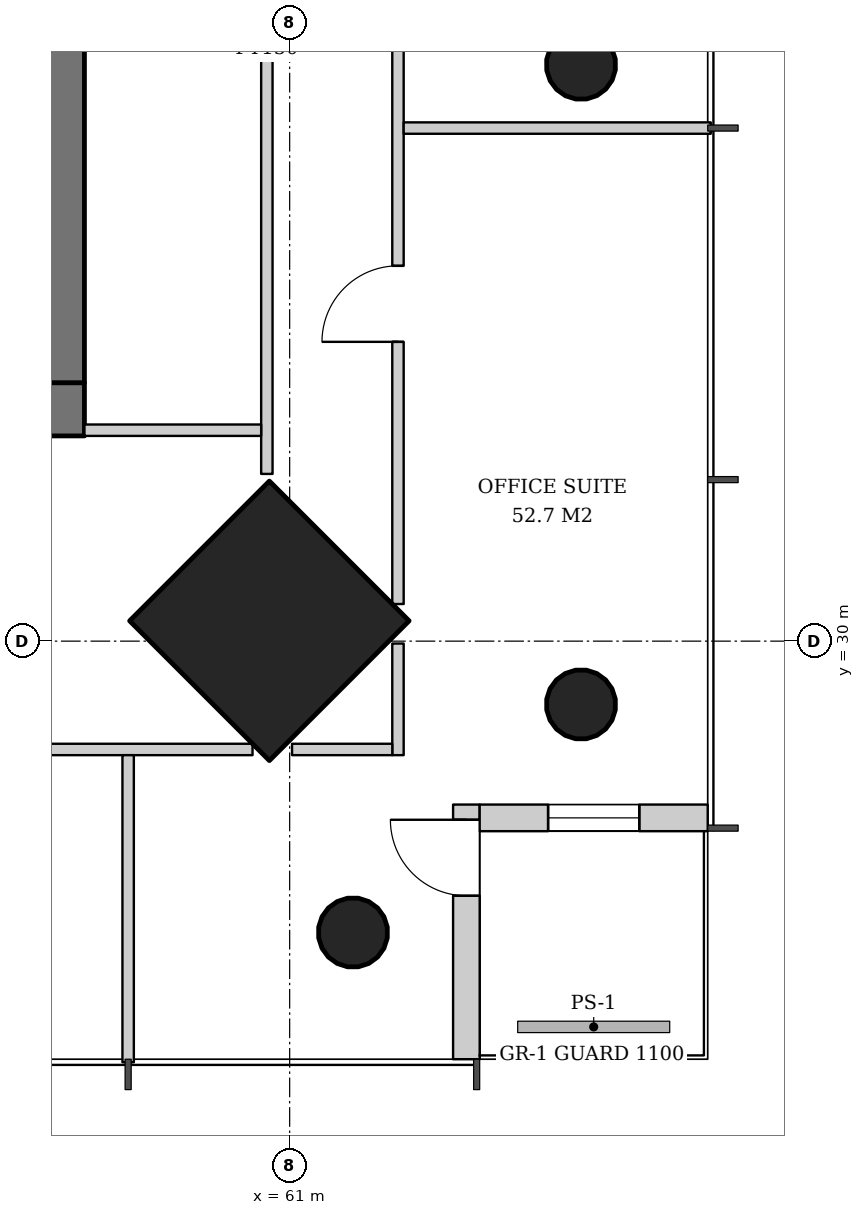
"""IFC4 building model, lengths in metres.
Left out: names, types, materials, properties, quantities, classifications, styles, units other than length and angle.
Written with IfcOpenShell. Run it as: python <this file> out.ifc"""

import sys

from ifc_helpers import new_model, si_unit, direction, frame, frame_2d, origin, origin_2d, place, context, subcontext, project, spatial, rectangle, hollow_circle, extrude, element, fill, save


model = new_model("IFC4")
c1 = context("Model", 3, precision=1e-05, world=origin(), true_north=direction((0.0, 1.0)))
c2 = subcontext(c1, "Body", "Model", "MODEL_VIEW")
j1 = project(units=[si_unit("LENGTHUNIT", "METRE"), si_unit("PLANEANGLEUNIT", "RADIAN")], contexts=[c1])
p1 = place(None, origin())
s1 = spatial("IfcSite", under=j1, at=p1, CompositionType="ELEMENT")
p2 = place(p1, origin())
s2 = spatial("IfcBuilding", under=s1, at=p2, CompositionType="ELEMENT")
p3 = place(p2, frame((0.0, 0.0, 150.2)))
s3 = spatial("IfcBuildingStorey", under=s2, at=p3, CompositionType="ELEMENT", Elevation=150.2)
p4 = place(p3, frame((64.871, 29.129, 0.0), z_axis=(-0.031898107953, 0.031898107953, 0.998981992539), x_axis=(-0.707106781187, -0.707106781187, 0.0)))
e1 = element("IfcColumn", 1, at=p4, inside=s3, PredefinedType="COLUMN", context=c2, shape_type="SweptSolid", body=[
    extrude(hollow_circle(Radius=0.457, WallThickness=0.03, at=origin_2d()), origin(), (0.0, 0.0, 1.0), 3.804),
])
p5 = place(p3, frame((64.871, 37.564, 0.0), z_axis=(-0.031910269556, 0.015987237665, 0.999362868496), x_axis=(-0.447933021895, -0.894067115991, 0.0)))
e2 = element("IfcColumn", 2, at=p5, inside=s3, PredefinedType="COLUMN", context=c2, shape_type="SweptSolid", body=[
    extrude(hollow_circle(Radius=0.457, WallThickness=0.03, at=origin_2d()), origin(), (0.0, 0.0, 1.0), 3.802),
])
p6 = place(p3, frame((60.771, 30.229, 0.0), z_axis=(-0.031962158256, 0.031962158256, 0.998977898093), x_axis=(-0.707106781187, -0.707106781187, 0.0)))
e3 = element("IfcColumn", 3, at=p6, inside=s3, PredefinedType="COLUMN", context=c2, shape_type="SweptSolid", body=[
    extrude(rectangle(XDim=2.6, YDim=2.6, at=origin_2d()), origin(), (0.0, 0.0, 1.0), 3.804),
])
p7 = place(p3, frame((61.871, 26.129, 0.0), z_axis=(-0.031898107953, 0.031898107953, 0.998981992539), x_axis=(-0.707106781187, -0.707106781187, 0.0)))
e4 = element("IfcColumn", 4, at=p7, inside=s3, PredefinedType="COLUMN", context=c2, shape_type="SweptSolid", body=[
    extrude(hollow_circle(Radius=0.457, WallThickness=0.03, at=origin_2d()), origin(), (0.0, 0.0, 1.0), 3.804),
])
p8 = place(p3, frame((31.7, 33.05, 0.0), z_axis=(0.0, 0.0, 1.0), x_axis=(1.0, 0.0, 0.0)))
e5 = element("IfcWall", 5, at=p8, inside=s3, PredefinedType="SHEAR", context=c2, shape_type="SweptSolid", body=[
    extrude(rectangle(XDim=26.6, YDim=0.7, at=frame_2d((13.3, 0.0))), origin(), (0.0, 0.0, 1.0), 3.8),
])
p9 = place(p8, frame((7.3, 0.0, 0.0)))
e6 = element("IfcOpeningElement", 6, at=p9, cuts=e5, PredefinedType="OPENING", context=c2, shape_type="SweptSolid", body=[
    extrude(rectangle(XDim=1.0, YDim=2.1, at=frame_2d((0.5, 1.05))), frame((0.0, 0.36, 0.0), z_axis=(0.0, -1.0, 0.0), x_axis=(1.0, 0.0, 0.0)), (0.0, 0.0, 1.0), 0.72),
])
p10 = place(p8, frame((18.75, 0.0, 0.0)))
e7 = element("IfcOpeningElement", 7, at=p10, cuts=e5, PredefinedType="OPENING", context=c2, shape_type="SweptSolid", body=[
    extrude(rectangle(XDim=1.0, YDim=2.1, at=frame_2d((0.5, 1.05))), frame((0.0, 0.36, 0.0), z_axis=(0.0, -1.0, 0.0), x_axis=(1.0, 0.0, 0.0)), (0.0, 0.0, 1.0), 0.72),
])
p11 = place(p8, frame((1.85, 0.0, 0.0)))
e8 = element("IfcOpeningElement", 8, at=p11, cuts=e5, PredefinedType="OPENING", context=c2, shape_type="SweptSolid", body=[
    extrude(rectangle(XDim=1.0, YDim=2.1, at=frame_2d((0.5, 1.05))), frame((0.0, 0.36, 0.0), z_axis=(0.0, -1.0, 0.0), x_axis=(1.0, 0.0, 0.0)), (0.0, 0.0, 1.0), 0.72),
])
p12 = place(p8, frame((4.7, 0.0, 0.0)))
e9 = element("IfcOpeningElement", 9, at=p12, cuts=e5, PredefinedType="OPENING", context=c2, shape_type="SweptSolid", body=[
    extrude(rectangle(XDim=1.0, YDim=2.1, at=frame_2d((0.5, 1.05))), frame((0.0, 0.36, 0.0), z_axis=(0.0, -1.0, 0.0), x_axis=(1.0, 0.0, 0.0)), (0.0, 0.0, 1.0), 0.72),
])
p13 = place(p8, frame((12.44, 0.0, 0.0)))
e10 = element("IfcOpeningElement", 10, at=p13, cuts=e5, PredefinedType="OPENING", context=c2, shape_type="SweptSolid", body=[
    extrude(rectangle(XDim=1.0, YDim=2.1, at=frame_2d((0.5, 1.05))), frame((0.0, 0.36, 0.0), z_axis=(0.0, -1.0, 0.0), x_axis=(1.0, 0.0, 0.0)), (0.0, 0.0, 1.0), 0.72),
])
p14 = place(p8, frame((20.644, 0.0, 0.0)))
e11 = element("IfcOpeningElement", 11, at=p14, cuts=e5, PredefinedType="OPENING", context=c2, shape_type="SweptSolid", body=[
    extrude(rectangle(XDim=1.0, YDim=2.1, at=frame_2d((0.5, 1.05))), frame((0.0, 0.36, 0.0), z_axis=(0.0, -1.0, 0.0), x_axis=(1.0, 0.0, 0.0)), (0.0, 0.0, 1.0), 0.72),
])
p15 = place(p8, frame((23.544, 0.0, 0.0)))
e12 = element("IfcOpeningElement", 12, at=p15, cuts=e5, PredefinedType="OPENING", context=c2, shape_type="SweptSolid", body=[
    extrude(rectangle(XDim=1.0, YDim=2.1, at=frame_2d((0.5, 1.05))), frame((0.0, 0.36, 0.0), z_axis=(0.0, -1.0, 0.0), x_axis=(1.0, 0.0, 0.0)), (0.0, 0.0, 1.0), 0.72),
])
p16 = place(p3, frame((57.95, 33.4, 0.0), z_axis=(0.0, 0.0, 1.0), x_axis=(0.0, 1.0, 0.0)))
e13 = element("IfcWall", 13, at=p16, inside=s3, PredefinedType="SHEAR", context=c2, shape_type="SweptSolid", body=[
    extrude(rectangle(XDim=25.2, YDim=0.7, at=frame_2d((12.6, 0.0))), origin(), (0.0, 0.0, 1.0), 3.8),
])
p17 = place(p16, frame((11.7, 0.0, 0.0)))
e14 = element("IfcOpeningElement", 14, at=p17, cuts=e13, PredefinedType="OPENING", context=c2, shape_type="SweptSolid", body=[
    extrude(rectangle(XDim=1.8, YDim=2.4, at=frame_2d((0.9, 1.2))), frame((0.0, 0.36, 0.0), z_axis=(0.0, -1.0, 0.0), x_axis=(1.0, 0.0, 0.0)), (0.0, 0.0, 1.0), 0.72),
])
p18 = place(p3, frame((63.325, 24.5, 0.0), z_axis=(0.0, 0.0, 1.0), x_axis=(0.0, 1.0, 0.0)))
e15 = element("IfcWall", 15, at=p18, inside=s3, PredefinedType="SOLIDWALL", context=c2, shape_type="SweptSolid", body=[
    extrude(rectangle(XDim=3.35, YDim=0.35, at=frame_2d((1.675, 0.0))), origin(), (0.0, 0.0, 1.0), 3.62),
])
p19 = place(p18, frame((2.15, 0.0, 0.0)))
e16 = element("IfcOpeningElement", 16, at=p19, cuts=e15, PredefinedType="OPENING", context=c2, shape_type="SweptSolid", body=[
    extrude(rectangle(XDim=1.0, YDim=2.4, at=frame_2d((0.5, 1.2))), frame((0.0, 0.185, 0.0), z_axis=(0.0, -1.0, 0.0), x_axis=(1.0, 0.0, 0.0)), (0.0, 0.0, 1.0), 0.37),
])
p20 = place(p3, frame((63.5, 27.675, 0.0), z_axis=(0.0, 0.0, 1.0), x_axis=(1.0, 0.0, 0.0)))
e17 = element("IfcWall", 17, at=p20, inside=s3, PredefinedType="SOLIDWALL", context=c2, shape_type="SweptSolid", body=[
    extrude(rectangle(XDim=3.0, YDim=0.35, at=frame_2d((1.5, 0.0))), origin(), (0.0, 0.0, 1.0), 3.62),
])
p21 = place(p20, frame((0.9, 0.0, 0.6)))
e18 = element("IfcOpeningElement", 18, at=p21, cuts=e17, PredefinedType="OPENING", context=c2, shape_type="SweptSolid", body=[
    extrude(rectangle(XDim=1.2, YDim=2.55, at=frame_2d((0.6, 1.275))), frame((0.0, 0.185, 0.0), z_axis=(0.0, -1.0, 0.0), x_axis=(1.0, 0.0, 0.0)), (0.0, 0.0, 1.0), 0.37),
])
p22 = place(p3, frame((60.7, 32.2, 0.0), z_axis=(0.0, 0.0, 1.0), x_axis=(0.0, 1.0, 0.0)))
e19 = element("IfcWall", 19, at=p22, inside=s3, PredefinedType="PARTITIONING", context=c2, shape_type="SweptSolid", body=[
    extrude(rectangle(XDim=11.775, YDim=0.15, at=frame_2d((5.888, 0.0))), origin(), (0.0, 0.0, 1.0), 2.72),
])
p23 = place(p22, frame((5.637, 0.0, 0.0)))
e20 = element("IfcOpeningElement", 20, at=p23, cuts=e19, PredefinedType="OPENING", context=c2, shape_type="SweptSolid", body=[
    extrude(rectangle(XDim=1.0, YDim=2.1, at=frame_2d((0.5, 1.05))), frame((0.0, 0.085, 0.0), z_axis=(0.0, -1.0, 0.0), x_axis=(1.0, 0.0, 0.0)), (0.0, 0.0, 1.0), 0.17),
])
p24 = place(p3, frame((58.3, 32.775, 0.0), z_axis=(0.0, 0.0, 1.0), x_axis=(1.0, 0.0, 0.0)))
e21 = element("IfcWall", 21, at=p24, inside=s3, PredefinedType="PARTITIONING", context=c2, shape_type="SweptSolid", body=[
    extrude(rectangle(XDim=2.325, YDim=0.15, at=frame_2d((1.163, 0.0))), origin(), (0.0, 0.0, 1.0), 3.62),
])
p25 = place(p3, frame((62.425, 28.5, 0.0), z_axis=(0.0, 0.0, 1.0), x_axis=(0.0, 1.0, 0.0)))
e22 = element("IfcWall", 22, at=p25, inside=s3, PredefinedType="PARTITIONING", context=c2, shape_type="SweptSolid", body=[
    extrude(rectangle(XDim=1.469, YDim=0.15, at=frame_2d((0.734, 0.0))), origin(), (0.0, 0.0, 1.0), 3.07),
])
p26 = place(p3, frame((62.425, 30.489, 0.0), z_axis=(0.0, 0.0, 1.0), x_axis=(0.0, 1.0, 0.0)))
e23 = element("IfcWall", 23, at=p26, inside=s3, PredefinedType="PARTITIONING", context=c2, shape_type="SweptSolid", body=[
    extrude(rectangle(XDim=31.023, YDim=0.15, at=frame_2d((15.511, 0.0))), origin(), (0.0, 0.0, 1.0), 2.72),
])
p27 = place(p26, frame((3.449, 0.0, 0.0)))
e24 = element("IfcOpeningElement", 24, at=p27, cuts=e23, PredefinedType="OPENING", context=c2, shape_type="SweptSolid", body=[
    extrude(rectangle(XDim=1.0, YDim=2.1, at=frame_2d((0.5, 1.05))), frame((0.0, 0.085, 0.0), z_axis=(0.0, -1.0, 0.0), x_axis=(1.0, 0.0, 0.0)), (0.0, 0.0, 1.0), 0.17),
])
p28 = place(p26, frame((8.074, 0.0, 0.0)))
e25 = element("IfcOpeningElement", 25, at=p28, cuts=e23, PredefinedType="OPENING", context=c2, shape_type="SweptSolid", body=[
    extrude(rectangle(XDim=1.0, YDim=2.1, at=frame_2d((0.5, 1.05))), frame((0.0, 0.085, 0.0), z_axis=(0.0, -1.0, 0.0), x_axis=(1.0, 0.0, 0.0)), (0.0, 0.0, 1.0), 0.17),
])
p29 = place(p26, frame((12.699, 0.0, 0.0)))
e26 = element("IfcOpeningElement", 26, at=p29, cuts=e23, PredefinedType="OPENING", context=c2, shape_type="SweptSolid", body=[
    extrude(rectangle(XDim=1.0, YDim=2.1, at=frame_2d((0.5, 1.05))), frame((0.0, 0.085, 0.0), z_axis=(0.0, -1.0, 0.0), x_axis=(1.0, 0.0, 0.0)), (0.0, 0.0, 1.0), 0.17),
])
p30 = place(p26, frame((17.324, 0.0, 0.0)))
e27 = element("IfcOpeningElement", 27, at=p30, cuts=e23, PredefinedType="OPENING", context=c2, shape_type="SweptSolid", body=[
    extrude(rectangle(XDim=1.0, YDim=2.1, at=frame_2d((0.5, 1.05))), frame((0.0, 0.085, 0.0), z_axis=(0.0, -1.0, 0.0), x_axis=(1.0, 0.0, 0.0)), (0.0, 0.0, 1.0), 0.17),
])
p31 = place(p26, frame((21.949, 0.0, 0.0)))
e28 = element("IfcOpeningElement", 28, at=p31, cuts=e23, PredefinedType="OPENING", context=c2, shape_type="SweptSolid", body=[
    extrude(rectangle(XDim=1.0, YDim=2.1, at=frame_2d((0.5, 1.05))), frame((0.0, 0.085, 0.0), z_axis=(0.0, -1.0, 0.0), x_axis=(1.0, 0.0, 0.0)), (0.0, 0.0, 1.0), 0.17),
])
p32 = place(p26, frame((26.574, 0.0, 0.0)))
e29 = element("IfcOpeningElement", 29, at=p32, cuts=e23, PredefinedType="OPENING", context=c2, shape_type="SweptSolid", body=[
    extrude(rectangle(XDim=1.0, YDim=2.1, at=frame_2d((0.5, 1.05))), frame((0.0, 0.085, 0.0), z_axis=(0.0, -1.0, 0.0), x_axis=(1.0, 0.0, 0.0)), (0.0, 0.0, 1.0), 0.17),
])
p33 = place(p3, frame((62.5, 36.75, 0.0), z_axis=(0.0, 0.0, 1.0), x_axis=(1.0, 0.0, 0.0)))
e30 = element("IfcWall", 30, at=p33, inside=s3, PredefinedType="PARTITIONING", context=c2, shape_type="SweptSolid", body=[
    extrude(rectangle(XDim=4.04, YDim=0.15, at=frame_2d((2.02, 0.0))), origin(), (0.0, 0.0, 1.0), 2.82),
])
p34 = place(p3, frame((29.489, 28.575, 0.0), z_axis=(0.0, 0.0, 1.0), x_axis=(1.0, 0.0, 0.0)))
e31 = element("IfcWall", 31, at=p34, inside=s3, PredefinedType="PARTITIONING", context=c2, shape_type="SweptSolid", body=[
    extrude(rectangle(XDim=31.023, YDim=0.15, at=frame_2d((15.511, 0.0))), origin(), (0.0, 0.0, 1.0), 2.72),
])
p35 = place(p34, frame((3.449, 0.0, 0.0)))
e32 = element("IfcOpeningElement", 32, at=p35, cuts=e31, PredefinedType="OPENING", context=c2, shape_type="SweptSolid", body=[
    extrude(rectangle(XDim=1.0, YDim=2.1, at=frame_2d((0.5, 1.05))), frame((0.0, 0.085, 0.0), z_axis=(0.0, -1.0, 0.0), x_axis=(1.0, 0.0, 0.0)), (0.0, 0.0, 1.0), 0.17),
])
p36 = place(p34, frame((8.074, 0.0, 0.0)))
e33 = element("IfcOpeningElement", 33, at=p36, cuts=e31, PredefinedType="OPENING", context=c2, shape_type="SweptSolid", body=[
    extrude(rectangle(XDim=1.0, YDim=2.1, at=frame_2d((0.5, 1.05))), frame((0.0, 0.085, 0.0), z_axis=(0.0, -1.0, 0.0), x_axis=(1.0, 0.0, 0.0)), (0.0, 0.0, 1.0), 0.17),
])
p37 = place(p34, frame((12.699, 0.0, 0.0)))
e34 = element("IfcOpeningElement", 34, at=p37, cuts=e31, PredefinedType="OPENING", context=c2, shape_type="SweptSolid", body=[
    extrude(rectangle(XDim=1.0, YDim=2.1, at=frame_2d((0.5, 1.05))), frame((0.0, 0.085, 0.0), z_axis=(0.0, -1.0, 0.0), x_axis=(1.0, 0.0, 0.0)), (0.0, 0.0, 1.0), 0.17),
])
p38 = place(p34, frame((17.324, 0.0, 0.0)))
e35 = element("IfcOpeningElement", 35, at=p38, cuts=e31, PredefinedType="OPENING", context=c2, shape_type="SweptSolid", body=[
    extrude(rectangle(XDim=1.0, YDim=2.1, at=frame_2d((0.5, 1.05))), frame((0.0, 0.085, 0.0), z_axis=(0.0, -1.0, 0.0), x_axis=(1.0, 0.0, 0.0)), (0.0, 0.0, 1.0), 0.17),
])
p39 = place(p34, frame((21.949, 0.0, 0.0)))
e36 = element("IfcOpeningElement", 36, at=p39, cuts=e31, PredefinedType="OPENING", context=c2, shape_type="SweptSolid", body=[
    extrude(rectangle(XDim=1.0, YDim=2.1, at=frame_2d((0.5, 1.05))), frame((0.0, 0.085, 0.0), z_axis=(0.0, -1.0, 0.0), x_axis=(1.0, 0.0, 0.0)), (0.0, 0.0, 1.0), 0.17),
])
p40 = place(p34, frame((26.574, 0.0, 0.0)))
e37 = element("IfcOpeningElement", 37, at=p40, cuts=e31, PredefinedType="OPENING", context=c2, shape_type="SweptSolid", body=[
    extrude(rectangle(XDim=1.0, YDim=2.1, at=frame_2d((0.5, 1.05))), frame((0.0, 0.085, 0.0), z_axis=(0.0, -1.0, 0.0), x_axis=(1.0, 0.0, 0.0)), (0.0, 0.0, 1.0), 0.17),
])
p41 = place(p3, frame((61.031, 28.575, 0.0), z_axis=(0.0, 0.0, 1.0), x_axis=(1.0, 0.0, 0.0)))
e38 = element("IfcWall", 38, at=p41, inside=s3, PredefinedType="PARTITIONING", context=c2, shape_type="SweptSolid", body=[
    extrude(rectangle(XDim=1.319, YDim=0.15, at=frame_2d((0.659, 0.0))), origin(), (0.0, 0.0, 1.0), 3.07),
])
p42 = place(p3, frame((58.875, 28.5, 0.0), z_axis=(0.0, 0.0, 1.0), x_axis=(0.0, -1.0, 0.0)))
e39 = element("IfcWall", 39, at=p42, inside=s3, PredefinedType="PARTITIONING", context=c2, shape_type="SweptSolid", body=[
    extrude(rectangle(XDim=4.04, YDim=0.15, at=frame_2d((2.02, 0.0))), origin(), (0.0, 0.0, 1.0), 2.82),
])
p43 = place(p19, origin())
e40 = element("IfcDoor", 40, at=p43, inside=s3, OperationType="SINGLE_SWING_RIGHT", PredefinedType="DOOR", context=c2, shape_type="SweptSolid", body=[
    extrude(rectangle(XDim=1.0, YDim=2.4, at=frame_2d((0.5, 1.2))), frame((0.0, 0.025, 0.0), z_axis=(0.0, -1.0, 0.0), x_axis=(1.0, 0.0, 0.0)), (0.0, 0.0, 1.0), 0.05),
])
fill(e16, e40)
p44 = place(p21, origin())
e41 = element("IfcWindow", 41, at=p44, inside=s3, PartitioningType="SINGLE_PANEL", PredefinedType="WINDOW", context=c2, shape_type="SweptSolid", body=[
    extrude(rectangle(XDim=1.2, YDim=2.55, at=frame_2d((0.6, 1.275))), frame((0.0, 0.03, 0.0), z_axis=(0.0, -1.0, 0.0), x_axis=(1.0, 0.0, 0.0)), (0.0, 0.0, 1.0), 0.06),
])
fill(e18, e41)
p45 = place(p27, origin())
e42 = element("IfcDoor", 42, at=p45, inside=s3, OperationType="SINGLE_SWING_LEFT", PredefinedType="DOOR", context=c2, shape_type="SweptSolid", body=[
    extrude(rectangle(XDim=1.0, YDim=2.1, at=frame_2d((0.5, 1.05))), frame((0.0, 0.025, 0.0), z_axis=(0.0, -1.0, 0.0), x_axis=(1.0, 0.0, 0.0)), (0.0, 0.0, 1.0), 0.05),
])
fill(e24, e42)
save(model, sys.argv[1])
